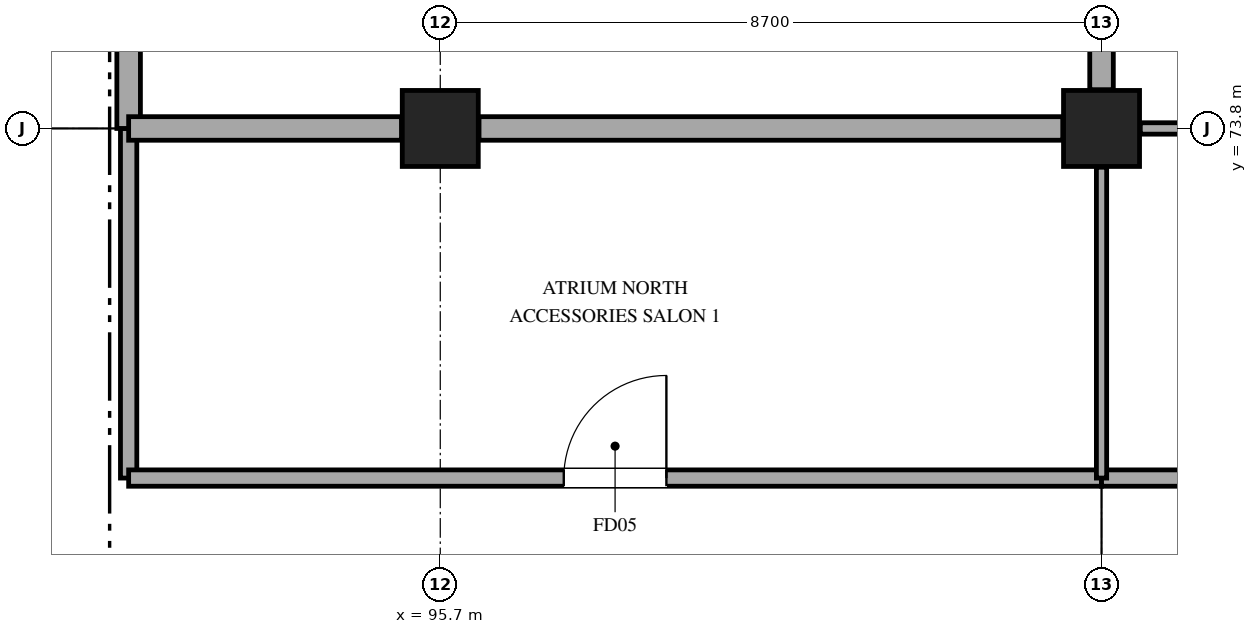
"""IFC4 building model, lengths in metres.
Left out: names, types, materials, properties, quantities, classifications, styles, units other than length and angle.
Written with IfcOpenShell. Run it as: python <this file> out.ifc"""

import sys

from ifc_helpers import new_model, si_unit, direction, frame, frame_2d, origin, origin_2d, place, context, subcontext, project, spatial, rectangle, extrude, element, fill, save


model = new_model("IFC4")
c1 = context("Model", 3, precision=1e-05, world=origin(), true_north=direction((0.0, 1.0)))
c2 = subcontext(c1, "Body", "Model", "MODEL_VIEW")
j1 = project(units=[si_unit("LENGTHUNIT", "METRE"), si_unit("PLANEANGLEUNIT", "RADIAN")], contexts=[c1])
p1 = place(None, origin())
s1 = spatial("IfcSite", under=j1, at=p1, CompositionType="ELEMENT")
p2 = place(p1, origin())
s2 = spatial("IfcBuilding", under=s1, at=p2, CompositionType="ELEMENT")
p3 = place(p2, origin())
s3 = spatial("IfcBuildingStorey", under=s2, at=p3, CompositionType="ELEMENT", Elevation=0.0)
for number, where, z_axis, x_axis in (
    (1, (95.7, 73.8, 0.0), (0.0, 0.0, 1.0), (1.0, 0.0, 0.0)),
    (2, (104.4, 73.8, 0.0), (0.0, 0.0, 1.0), (1.0, 0.0, 0.0)),
):
    element("IfcColumn", number, at=place(p3, frame(where, z_axis=z_axis, x_axis=x_axis)), inside=s3, PredefinedType="COLUMN", context=c2, shape_type="SweptSolid", body=[
        extrude(rectangle(XDim=1.0, YDim=1.0, at=origin_2d()), origin(), (0.0, 0.0, 1.0), 6.0),
    ])
p4 = place(p3, frame((91.6, 73.8, 0.0), z_axis=(0.0, 0.0, 1.0), x_axis=(0.0, -1.0, 0.0)))
e3 = element("IfcWall", 3, at=p4, inside=s3, PredefinedType="PARTITIONING", context=c2, shape_type="SweptSolid", body=[
    extrude(rectangle(XDim=4.6, YDim=0.215, at=frame_2d((2.3, 0.0))), origin(), (0.0, 0.0, 1.0), 4.91),
])
p5 = place(p3, frame((91.6, 69.2, 0.0), z_axis=(0.0, 0.0, 1.0), x_axis=(1.0, 0.0, 0.0)))
e4 = element("IfcWall", 4, at=p5, inside=s3, PredefinedType="PARTITIONING", context=c2, shape_type="SweptSolid", body=[
    extrude(rectangle(XDim=12.8, YDim=0.215, at=frame_2d((6.4, 0.0))), origin(), (0.0, 0.0, 1.0), 4.91),
])
p6 = place(p5, frame((5.725, 0.0, 0.0)))
e5 = element("IfcOpeningElement", 5, at=p6, cuts=e4, PredefinedType="OPENING", context=c2, shape_type="SweptSolid", body=[
    extrude(rectangle(XDim=1.35, YDim=2.2, at=frame_2d((0.675, 1.1))), frame((0.0, 0.118, 0.0), z_axis=(0.0, -1.0, 0.0), x_axis=(1.0, 0.0, 0.0)), (0.0, 0.0, 1.0), 0.235),
])
p7 = place(p3, frame((104.4, 69.2, 0.0), z_axis=(0.0, 0.0, 1.0), x_axis=(1.0, 0.0, 0.0)))
e6 = element("IfcWall", 6, at=p7, inside=s3, PredefinedType="PARTITIONING", context=c2, shape_type="SweptSolid", body=[
    extrude(rectangle(XDim=21.6, YDim=0.215, at=frame_2d((10.8, 0.0))), origin(), (0.0, 0.0, 1.0), 4.91),
])
p8 = place(p7, frame((10.125, 0.0, 0.0)))
e7 = element("IfcOpeningElement", 7, at=p8, cuts=e6, PredefinedType="OPENING", context=c2, shape_type="SweptSolid", body=[
    extrude(rectangle(XDim=1.35, YDim=2.2, at=frame_2d((0.675, 1.1))), frame((0.0, 0.118, 0.0), z_axis=(0.0, -1.0, 0.0), x_axis=(1.0, 0.0, 0.0)), (0.0, 0.0, 1.0), 0.235),
])
p9 = place(p3, frame((91.6, 94.8, 0.0), z_axis=(0.0, 0.0, 1.0), x_axis=(0.0, -1.0, 0.0)))
e8 = element("IfcWall", 8, at=p9, inside=s3, PredefinedType="STANDARD", context=c2, shape_type="SweptSolid", body=[
    extrude(rectangle(XDim=21.0, YDim=0.31, at=frame_2d((10.5, 0.0))), origin(), (0.0, 0.0, 1.0), 4.88),
])
p10 = place(p9, frame((9.575, 0.0, 0.0)))
e9 = element("IfcOpeningElement", 9, at=p10, cuts=e8, PredefinedType="OPENING", context=c2, shape_type="SweptSolid", body=[
    extrude(rectangle(XDim=1.85, YDim=2.3, at=frame_2d((0.925, 1.15))), frame((0.0, 0.165, 0.0), z_axis=(0.0, -1.0, 0.0), x_axis=(1.0, 0.0, 0.0)), (0.0, 0.0, 1.0), 0.33),
])
p11 = place(p3, frame((104.4, 73.29, 0.0), z_axis=(0.0, 0.0, 1.0), x_axis=(0.0, -1.0, 0.0)))
e10 = element("IfcWall", 10, at=p11, inside=s3, PredefinedType="PARTITIONING", context=c2, shape_type="SweptSolid", body=[
    extrude(rectangle(XDim=4.09, YDim=0.135, at=frame_2d((2.045, 0.0))), origin(), (0.0, 0.0, 1.0), 4.91),
])
p12 = place(p3, frame((91.6, 73.8, 0.0), z_axis=(0.0, 0.0, 1.0), x_axis=(1.0, 0.0, 0.0)))
e11 = element("IfcWall", 11, at=p12, inside=s3, PredefinedType="STANDARD", context=c2, shape_type="SweptSolid", body=[
    extrude(rectangle(XDim=3.59, YDim=0.31, at=frame_2d((1.795, 0.0))), origin(), (0.0, 0.0, 1.0), 4.91),
])
p13 = place(p3, frame((96.21, 73.8, 0.0), z_axis=(0.0, 0.0, 1.0), x_axis=(1.0, 0.0, 0.0)))
e12 = element("IfcWall", 12, at=p13, inside=s3, PredefinedType="STANDARD", context=c2, shape_type="SweptSolid", body=[
    extrude(rectangle(XDim=7.68, YDim=0.31, at=frame_2d((3.84, 0.0))), origin(), (0.0, 0.0, 1.0), 4.91),
])
p14 = place(p3, frame((104.91, 73.8, 0.0), z_axis=(0.0, 0.0, 1.0), x_axis=(1.0, 0.0, 0.0)))
e13 = element("IfcWall", 13, at=p14, inside=s3, PredefinedType="PARTITIONING", context=c2, shape_type="SweptSolid", body=[
    extrude(rectangle(XDim=7.68, YDim=0.15, at=frame_2d((3.84, 0.0))), origin(), (0.0, 0.0, 1.0), 4.91),
])
p15 = place(p3, frame((104.4, 81.69, 0.0), z_axis=(0.0, 0.0, 1.0), x_axis=(0.0, -1.0, 0.0)))
e14 = element("IfcWall", 14, at=p15, inside=s3, PredefinedType="STANDARD", context=c2, shape_type="SweptSolid", body=[
    extrude(rectangle(XDim=7.38, YDim=0.31, at=frame_2d((3.69, 0.0))), origin(), (0.0, 0.0, 1.0), 4.88),
])
p16 = place(p6, origin())
e15 = element("IfcDoor", 15, at=p16, inside=s3, OperationType="SINGLE_SWING_RIGHT", PredefinedType="DOOR", context=c2, shape_type="SweptSolid", body=[
    extrude(rectangle(XDim=1.35, YDim=2.2, at=frame_2d((0.675, 1.1))), frame((0.0, 0.025, 0.0), z_axis=(0.0, -1.0, 0.0), x_axis=(1.0, 0.0, 0.0)), (0.0, 0.0, 1.0), 0.05),
])
fill(e5, e15)
save(model, sys.argv[1])
